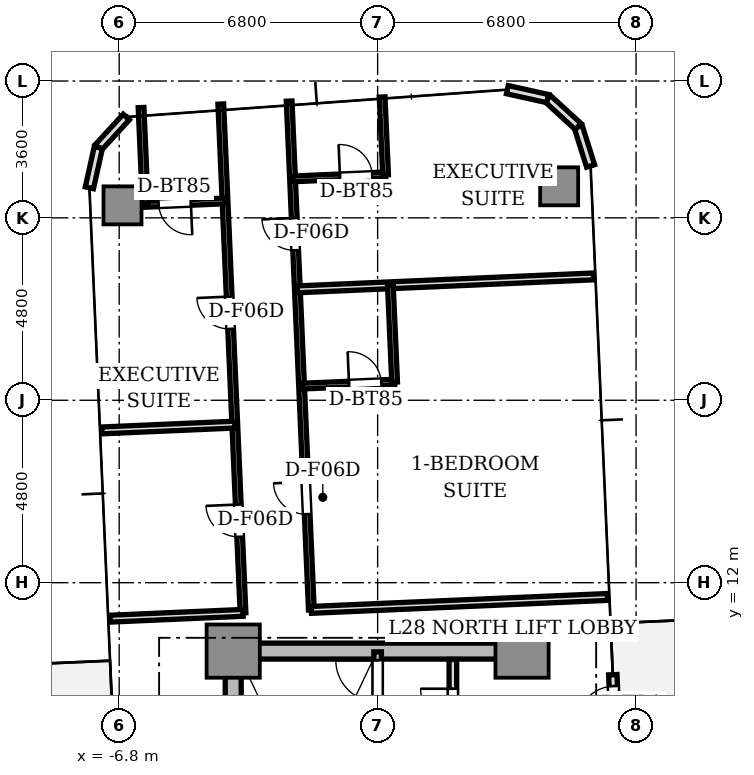
"""IFC4 building model, lengths in metres.
Left out: names, types, materials, properties, quantities, classifications, styles, units other than length and angle.
Written with IfcOpenShell. Run it as: python <this file> out.ifc"""

import sys

from ifc_helpers import new_model, si_unit, direction, frame, frame_2d, origin, origin_2d, place, context, subcontext, project, spatial, rectangle, extrude, source, transform, mapped, element, fill, save


model = new_model("IFC4")
c1 = context("Model", 3, precision=1e-05, world=origin(), true_north=direction((0.0, 1.0)))
c2 = subcontext(c1, "Body", "Model", "MODEL_VIEW")
j1 = project(units=[si_unit("LENGTHUNIT", "METRE"), si_unit("PLANEANGLEUNIT", "RADIAN")], contexts=[c1])
p1 = place(None, origin())
s1 = spatial("IfcSite", under=j1, at=p1, CompositionType="ELEMENT")
p2 = place(p1, origin())
s2 = spatial("IfcBuilding", under=s1, at=p2, CompositionType="ELEMENT")
p3 = place(p2, frame((0.0, 0.0, 103.6)))
s3 = spatial("IfcBuildingStorey", under=s2, at=p3, CompositionType="ELEMENT", Elevation=103.6)
p4 = place(p3, frame((-3.55, 10.2, 0.0), z_axis=(0.0, 0.0, 1.0), x_axis=(1.0, 0.0, 0.0)))
e1 = element("IfcWall", 1, at=p4, inside=s3, PredefinedType="SHEAR", context=c2, shape_type="SweptSolid", body=[
    extrude(rectangle(XDim=7.1, YDim=0.42, at=frame_2d((3.55, 0.0))), origin(), (0.0, 0.0, 1.0), 3.05),
])
p5 = place(p3, frame((-3.8, 2.85, 0.0), z_axis=(0.0, 0.0, 1.0), x_axis=(0.0, 1.0, 0.0)))
e2 = element("IfcWall", 2, at=p5, inside=s3, PredefinedType="SHEAR", context=c2, shape_type="SweptSolid", body=[
    extrude(rectangle(XDim=6.9, YDim=0.42, at=frame_2d((3.45, 0.0))), origin(), (0.0, 0.0, 1.0), 3.05),
])
m1 = source(origin(), c2, "Body", "SweptSolid", [
    extrude(rectangle(XDim=1.4, YDim=1.4, at=origin_2d()), origin(), (0.0, 0.0, 1.0), 3.05),
])
for number, where, z_axis, x_axis in (
    (3, (-3.8, 10.2, 0.0), (0.0, 0.0, 1.0), (1.0, 0.0, 0.0)),
    (4, (3.8, 10.2, 0.0), (0.0, 0.0, 1.0), (1.0, 0.0, 0.0)),
):
    element("IfcColumn", number, at=place(p3, frame(where, z_axis=z_axis, x_axis=x_axis)), inside=s3, PredefinedType="COLUMN", context=c2, shape_type="MappedRepresentation", body=[
        mapped(m1, transform((0.0, 0.0, 0.0), scale=1.0)),
    ])
m2 = source(origin(), c2, "Body", "SweptSolid", [
    extrude(rectangle(XDim=1.0, YDim=1.0, at=origin_2d()), origin(), (0.0, 0.0, 1.0), 3.05),
])
for number, where, z_axis, x_axis in (
    (5, (4.776, 22.43, 0.0), (0.0, 0.0, 1.0), (1.0, 0.0, 0.0)),
    (6, (-6.713, 21.928, 0.0), (0.0, 0.0, 1.0), (1.0, 0.0, 0.0)),
):
    element("IfcColumn", number, at=place(p3, frame(where, z_axis=z_axis, x_axis=x_axis)), inside=s3, PredefinedType="COLUMN", context=c2, shape_type="MappedRepresentation", body=[
        mapped(m2, transform((0.0, 0.0, 0.0), scale=1.0)),
    ])
p6 = place(p3, frame((6.306, 6.882, 0.0), z_axis=(0.0, 0.0, 1.0), x_axis=(-0.043672655174, 0.999045894436, 0.0)))
e7 = element("IfcWall", 7, at=p6, inside=s3, PredefinedType="STANDARD", context=c2, shape_type="SweptSolid", body=[
    extrude(rectangle(XDim=2.7, YDim=0.22, at=frame_2d((1.35, 0.0))), origin(), (0.0, 0.0, 1.0), 3.05),
])
p7 = place(p6, frame((1.4, 0.0, 0.0)))
e8 = element("IfcOpeningElement", 8, at=p7, cuts=e7, PredefinedType="OPENING", context=c2, shape_type="SweptSolid", body=[
    extrude(rectangle(XDim=1.0, YDim=2.2, at=frame_2d((0.5, 1.1))), frame((0.0, 0.12, 0.0), z_axis=(0.0, -1.0, 0.0), x_axis=(1.0, 0.0, 0.0)), (0.0, 0.0, 1.0), 0.24),
])
p8 = place(p3, frame((5.604, 22.966, 0.0), z_axis=(0.0, 0.0, 1.0), x_axis=(-0.300755105707, 0.953701403161, 0.0)))
e9 = element("IfcWall", 9, at=p8, inside=s3, PredefinedType="STANDARD", context=c2, shape_type="SweptSolid", body=[
    extrude(rectangle(XDim=1.087, YDim=0.22, at=frame_2d((0.543, 0.0))), origin(), (0.0, 0.0, 1.0), 3.05),
])
p9 = place(p3, frame((5.277, 24.003, 0.0), z_axis=(0.0, 0.0, 1.0), x_axis=(-0.737312600672, 0.675551721847, 0.0)))
e10 = element("IfcWall", 10, at=p9, inside=s3, PredefinedType="STANDARD", context=c2, shape_type="SweptSolid", body=[
    extrude(rectangle(XDim=1.087, YDim=0.22, at=frame_2d((0.543, 0.0))), origin(), (0.0, 0.0, 1.0), 3.05),
])
for number, where, z_axis, x_axis in (
    (11, (4.475, 24.737, 0.0), (0.0, 0.0, 1.0), (-0.976, 0.217, 0.0)),
    (12, (-6.614, 24.253, 0.0), (0.0, 0.0, 1.0), (-0.676, -0.737, 0.0)),
):
    element("IfcWall", number, at=place(p3, frame(where, z_axis=z_axis, x_axis=x_axis)), inside=s3, PredefinedType="STANDARD", context=c2, shape_type="SweptSolid", body=[
        extrude(rectangle(XDim=1.087, YDim=0.22, at=frame_2d((0.543, 0.0))), origin(), (0.0, 0.0, 1.0), 3.05),
    ])
p10 = place(p3, frame((-7.349, 23.452, 0.0), z_axis=(0.0, 0.0, 1.0), x_axis=(-0.216454939174, -0.976292609471, 0.0)))
e13 = element("IfcWall", 13, at=p10, inside=s3, PredefinedType="STANDARD", context=c2, shape_type="SweptSolid", body=[
    extrude(rectangle(XDim=1.087, YDim=0.22, at=frame_2d((0.544, 0.0))), origin(), (0.0, 0.0, 1.0), 3.05),
])
p11 = place(p3, frame((0.0, 2.5, 0.0), z_axis=(0.0, 0.0, 1.0), x_axis=(0.0, 1.0, 0.0)))
e14 = element("IfcWall", 14, at=p11, inside=s3, PredefinedType="SOLIDWALL", context=c2, shape_type="SweptSolid", body=[
    extrude(rectangle(XDim=7.68, YDim=0.2, at=frame_2d((3.84, 0.0))), origin(), (0.0, 0.0, 1.0), 3.05),
])
p12 = place(p11, frame((6.36, 0.0, 0.0)))
e15 = element("IfcOpeningElement", 15, at=p12, cuts=e14, PredefinedType="OPENING", context=c2, shape_type="SweptSolid", body=[
    extrude(rectangle(XDim=1.1, YDim=2.15, at=frame_2d((0.55, 1.075))), frame((0.0, 0.11, 0.0), z_axis=(0.0, -1.0, 0.0), x_axis=(1.0, 0.0, 0.0)), (0.0, 0.0, 1.0), 0.22),
])
p13 = place(p3, frame((1.98, 5.32, 0.0), z_axis=(0.0, 0.0, 1.0), x_axis=(0.0, 1.0, 0.0)))
e16 = element("IfcWall", 16, at=p13, inside=s3, PredefinedType="SOLIDWALL", context=c2, shape_type="SweptSolid", body=[
    extrude(rectangle(XDim=4.66, YDim=0.2, at=frame_2d((2.33, 0.0))), origin(), (0.0, 0.0, 1.0), 2.6),
])
p14 = place(p13, frame((3.04, 0.0, 0.0)))
e17 = element("IfcOpeningElement", 17, at=p14, cuts=e16, PredefinedType="OPENING", context=c2, shape_type="SweptSolid", body=[
    extrude(rectangle(XDim=0.85, YDim=2.1, at=frame_2d((0.425, 1.05))), frame((0.0, 0.11, 0.0), z_axis=(0.0, -1.0, 0.0), x_axis=(1.0, 0.0, 0.0)), (0.0, 0.0, 1.0), 0.22),
])
p15 = place(p3, frame((-3.542, 11.206, 0.0), z_axis=(0.0, 0.0, 1.0), x_axis=(-0.043617493533, 0.999048304267, 0.0)))
e18 = element("IfcWall", 18, at=p15, inside=s3, PredefinedType="PARTITIONING", context=c2, shape_type="SweptSolid", body=[
    extrude(rectangle(XDim=13.4, YDim=0.15, at=frame_2d((6.7, 0.0))), origin(), (0.0, 0.0, 1.0), 2.6),
])
p16 = place(p15, frame((2.004, 0.0, 0.0)))
e19 = element("IfcOpeningElement", 19, at=p16, cuts=e18, PredefinedType="OPENING", context=c2, shape_type="SweptSolid", body=[
    extrude(rectangle(XDim=0.85, YDim=2.1, at=frame_2d((0.425, 1.05))), frame((0.0, 0.085, 0.0), z_axis=(0.0, -1.0, 0.0), x_axis=(1.0, 0.0, 0.0)), (0.0, 0.0, 1.0), 0.17),
])
p17 = place(p15, frame((7.479, 0.0, 0.0)))
e20 = element("IfcOpeningElement", 20, at=p17, cuts=e18, PredefinedType="OPENING", context=c2, shape_type="SweptSolid", body=[
    extrude(rectangle(XDim=0.85, YDim=2.1, at=frame_2d((0.425, 1.05))), frame((0.0, 0.085, 0.0), z_axis=(0.0, -1.0, 0.0), x_axis=(1.0, 0.0, 0.0)), (0.0, 0.0, 1.0), 0.17),
])
p18 = place(p3, frame((-1.744, 11.285, 0.0), z_axis=(0.0, 0.0, 1.0), x_axis=(-0.043617493533, 0.999048304267, 0.0)))
e21 = element("IfcWall", 21, at=p18, inside=s3, PredefinedType="PARTITIONING", context=c2, shape_type="SweptSolid", body=[
    extrude(rectangle(XDim=13.4, YDim=0.15, at=frame_2d((6.7, 0.0))), origin(), (0.0, 0.0, 1.0), 2.6),
])
p19 = place(p18, frame((2.521, 0.0, 0.0)))
e22 = element("IfcOpeningElement", 22, at=p19, cuts=e21, PredefinedType="OPENING", context=c2, shape_type="SweptSolid", body=[
    extrude(rectangle(XDim=0.85, YDim=2.1, at=frame_2d((0.425, 1.05))), frame((0.0, 0.085, 0.0), z_axis=(0.0, -1.0, 0.0), x_axis=(1.0, 0.0, 0.0)), (0.0, 0.0, 1.0), 0.17),
])
p20 = place(p18, frame((9.471, 0.0, 0.0)))
e23 = element("IfcOpeningElement", 23, at=p20, cuts=e21, PredefinedType="OPENING", context=c2, shape_type="SweptSolid", body=[
    extrude(rectangle(XDim=0.85, YDim=2.1, at=frame_2d((0.425, 1.05))), frame((0.0, 0.085, 0.0), z_axis=(0.0, -1.0, 0.0), x_axis=(1.0, 0.0, 0.0)), (0.0, 0.0, 1.0), 0.17),
])
p21 = place(p3, frame((-3.542, 11.206, 0.0), z_axis=(0.0, 0.0, 1.0), x_axis=(-0.999046129111, -0.04366728647, 0.0)))
e24 = element("IfcWall", 24, at=p21, inside=s3, PredefinedType="PARTITIONING", context=c2, shape_type="SweptSolid", body=[
    extrude(rectangle(XDim=3.5, YDim=0.18, at=frame_2d((1.75, 0.0))), origin(), (0.0, 0.0, 1.0), 2.6),
])
p22 = place(p3, frame((6.049, 11.625, 0.0), z_axis=(0.0, 0.0, 1.0), x_axis=(-0.999047634936, -0.043632821702, 0.0)))
e25 = element("IfcWall", 25, at=p22, inside=s3, PredefinedType="PARTITIONING", context=c2, shape_type="SweptSolid", body=[
    extrude(rectangle(XDim=7.8, YDim=0.18, at=frame_2d((3.9, 0.0))), origin(), (0.0, 0.0, 1.0), 2.6),
])
p23 = place(p3, frame((-3.758, 16.159, 0.0), z_axis=(0.0, 0.0, 1.0), x_axis=(-0.999049302422, -0.04359462501, 0.0)))
e26 = element("IfcWall", 26, at=p23, inside=s3, PredefinedType="PARTITIONING", context=c2, shape_type="SweptSolid", body=[
    extrude(rectangle(XDim=3.5, YDim=0.18, at=frame_2d((1.75, 0.0))), origin(), (0.0, 0.0, 1.0), 2.6),
])
p24 = place(p3, frame((-4.015, 22.046, 0.0), z_axis=(0.0, 0.0, 1.0), x_axis=(-0.999044054836, -0.043714717167, 0.0)))
e27 = element("IfcWall", 27, at=p24, inside=s3, PredefinedType="PARTITIONING", context=c2, shape_type="SweptSolid", body=[
    extrude(rectangle(XDim=2.1, YDim=0.15, at=frame_2d((1.05, 0.0))), origin(), (0.0, 0.0, 1.0), 2.52),
])
p25 = place(p24, frame((0.9, 0.0, 0.0)))
e28 = element("IfcOpeningElement", 28, at=p25, cuts=e27, PredefinedType="OPENING", context=c2, shape_type="SweptSolid", body=[
    extrude(rectangle(XDim=0.85, YDim=2.1, at=frame_2d((0.425, 1.05))), frame((0.0, 0.085, 0.0), z_axis=(0.0, -1.0, 0.0), x_axis=(1.0, 0.0, 0.0)), (0.0, 0.0, 1.0), 0.17),
])
p26 = place(p3, frame((-6.113, 21.954, 0.0), z_axis=(0.0, 0.0, 1.0), x_axis=(-0.043657425146, 0.999046560091, 0.0)))
e29 = element("IfcWall", 29, at=p26, inside=s3, PredefinedType="PARTITIONING", context=c2, shape_type="SweptSolid", body=[
    extrude(rectangle(XDim=2.55, YDim=0.15, at=frame_2d((1.275, 0.0))), origin(), (0.0, 0.0, 1.0), 2.6),
])
p27 = place(p3, frame((-2.112, 19.719, 0.0), z_axis=(0.0, 0.0, 1.0), x_axis=(0.999047634936, 0.043632821702, 0.0)))
e30 = element("IfcWall", 30, at=p27, inside=s3, PredefinedType="PARTITIONING", context=c2, shape_type="SweptSolid", body=[
    extrude(rectangle(XDim=7.8, YDim=0.18, at=frame_2d((3.9, 0.0))), origin(), (0.0, 0.0, 1.0), 2.6),
])
p28 = place(p3, frame((-2.001, 17.171, 0.0), z_axis=(0.0, 0.0, 1.0), x_axis=(0.99905145222, 0.043545330602, 0.0)))
e31 = element("IfcWall", 31, at=p28, inside=s3, PredefinedType="PARTITIONING", context=c2, shape_type="SweptSolid", body=[
    extrude(rectangle(XDim=2.45, YDim=0.15, at=frame_2d((1.225, 0.0))), origin(), (0.0, 0.0, 1.0), 2.6),
])
p29 = place(p28, frame((1.25, 0.0, 0.0)))
e32 = element("IfcOpeningElement", 32, at=p29, cuts=e31, PredefinedType="OPENING", context=c2, shape_type="SweptSolid", body=[
    extrude(rectangle(XDim=0.85, YDim=2.1, at=frame_2d((0.425, 1.05))), frame((0.0, 0.085, 0.0), z_axis=(0.0, -1.0, 0.0), x_axis=(1.0, 0.0, 0.0)), (0.0, 0.0, 1.0), 0.17),
])
p30 = place(p3, frame((0.447, 17.278, 0.0), z_axis=(0.0, 0.0, 1.0), x_axis=(-0.043657425146, 0.999046560091, 0.0)))
e33 = element("IfcWall", 33, at=p30, inside=s3, PredefinedType="PARTITIONING", context=c2, shape_type="SweptSolid", body=[
    extrude(rectangle(XDim=2.55, YDim=0.15, at=frame_2d((1.275, 0.0))), origin(), (0.0, 0.0, 1.0), 2.6),
])
p31 = place(p3, frame((-2.239, 22.624, 0.0), z_axis=(0.0, 0.0, 1.0), x_axis=(0.999047112283, 0.043644787072, 0.0)))
e34 = element("IfcWall", 34, at=p31, inside=s3, PredefinedType="PARTITIONING", context=c2, shape_type="SweptSolid", body=[
    extrude(rectangle(XDim=2.45, YDim=0.15, at=frame_2d((1.225, 0.0))), origin(), (0.0, 0.0, 1.0), 2.6),
])
p32 = place(p31, frame((1.25, 0.0, 0.0)))
e35 = element("IfcOpeningElement", 35, at=p32, cuts=e34, PredefinedType="OPENING", context=c2, shape_type="SweptSolid", body=[
    extrude(rectangle(XDim=0.85, YDim=2.1, at=frame_2d((0.425, 1.05))), frame((0.0, 0.085, 0.0), z_axis=(0.0, -1.0, 0.0), x_axis=(1.0, 0.0, 0.0)), (0.0, 0.0, 1.0), 0.17),
])
p33 = place(p3, frame((0.209, 22.731, 0.0), z_axis=(0.0, 0.0, 1.0), x_axis=(-0.043587097972, 0.999049630844, 0.0)))
e36 = element("IfcWall", 36, at=p33, inside=s3, PredefinedType="PARTITIONING", context=c2, shape_type="SweptSolid", body=[
    extrude(rectangle(XDim=2.05, YDim=0.15, at=frame_2d((1.025, 0.0))), origin(), (0.0, 0.0, 1.0), 2.6),
])
m3 = source(origin(), c2, "Body", "SweptSolid", [
    extrude(rectangle(XDim=1.0, YDim=0.05, at=origin_2d()), origin(), (0.0, 0.0, 1.0), 2.2),
])
p34 = place(p7, frame((0.5, 0.0, 0.0)))
e37 = element("IfcDoor", 37, at=p34, inside=s3, OperationType="SINGLE_SWING_LEFT", PredefinedType="DOOR", context=c2, shape_type="MappedRepresentation", body=[
    mapped(m3, transform((0.0, 0.0, 0.0), scale=1.0)),
])
fill(e8, e37)
m4 = source(origin(), c2, "Body", "SweptSolid", [
    extrude(rectangle(XDim=1.1, YDim=0.05, at=origin_2d()), origin(), (0.0, 0.0, 1.0), 2.15),
])
p35 = place(p12, frame((0.55, 0.0, 0.0)))
e38 = element("IfcDoor", 38, at=p35, inside=s3, OperationType="SINGLE_SWING_RIGHT", PredefinedType="DOOR", context=c2, shape_type="MappedRepresentation", body=[
    mapped(m4, transform((0.0, 0.0, 0.0), scale=1.0)),
])
fill(e15, e38)
m5 = source(origin(), c2, "Body", "SweptSolid", [
    extrude(rectangle(XDim=0.85, YDim=0.05, at=origin_2d()), origin(), (0.0, 0.0, 1.0), 2.1),
])
p36 = place(p14, frame((0.425, 0.0, 0.0)))
e39 = element("IfcDoor", 39, at=p36, inside=s3, OperationType="SINGLE_SWING_RIGHT", PredefinedType="DOOR", context=c2, shape_type="MappedRepresentation", body=[
    mapped(m5, transform((0.0, 0.0, 0.0), scale=1.0)),
])
fill(e17, e39)
p37 = place(p16, frame((0.425, 0.0, 0.0)))
e40 = element("IfcDoor", 40, at=p37, inside=s3, OperationType="SINGLE_SWING_RIGHT", PredefinedType="DOOR", context=c2, shape_type="MappedRepresentation", body=[
    mapped(m5, transform((0.0, 0.0, 0.0), scale=1.0)),
])
fill(e19, e40)
p38 = place(p25, frame((0.425, 0.0, 0.0)))
e41 = element("IfcDoor", 41, at=p38, inside=s3, OperationType="SINGLE_SWING_LEFT", PredefinedType="DOOR", context=c2, shape_type="MappedRepresentation", body=[
    mapped(m5, transform((0.0, 0.0, 0.0), scale=1.0)),
])
fill(e28, e41)
p39 = place(p17, frame((0.425, 0.0, 0.0)))
e42 = element("IfcDoor", 42, at=p39, inside=s3, OperationType="SINGLE_SWING_RIGHT", PredefinedType="DOOR", context=c2, shape_type="MappedRepresentation", body=[
    mapped(m5, transform((0.0, 0.0, 0.0), scale=1.0)),
])
fill(e20, e42)
p40 = place(p29, frame((0.425, 0.0, 0.0)))
e43 = element("IfcDoor", 43, at=p40, inside=s3, OperationType="SINGLE_SWING_LEFT", PredefinedType="DOOR", context=c2, shape_type="MappedRepresentation", body=[
    mapped(m5, transform((0.0, 0.0, 0.0), scale=1.0)),
])
fill(e32, e43)
p41 = place(p19, frame((0.425, 0.0, 0.0)))
e44 = element("IfcDoor", 44, at=p41, inside=s3, OperationType="SINGLE_SWING_RIGHT", PredefinedType="DOOR", context=c2, shape_type="MappedRepresentation", body=[
    mapped(m5, transform((0.0, 0.0, 0.0), scale=1.0)),
])
fill(e22, e44)
p42 = place(p32, frame((0.425, 0.0, 0.0)))
e45 = element("IfcDoor", 45, at=p42, inside=s3, OperationType="SINGLE_SWING_LEFT", PredefinedType="DOOR", context=c2, shape_type="MappedRepresentation", body=[
    mapped(m5, transform((0.0, 0.0, 0.0), scale=1.0)),
])
fill(e35, e45)
p43 = place(p20, frame((0.425, 0.0, 0.0)))
e46 = element("IfcDoor", 46, at=p43, inside=s3, OperationType="SINGLE_SWING_RIGHT", PredefinedType="DOOR", context=c2, shape_type="MappedRepresentation", body=[
    mapped(m5, transform((0.0, 0.0, 0.0), scale=1.0)),
])
fill(e23, e46)
save(model, sys.argv[1])
